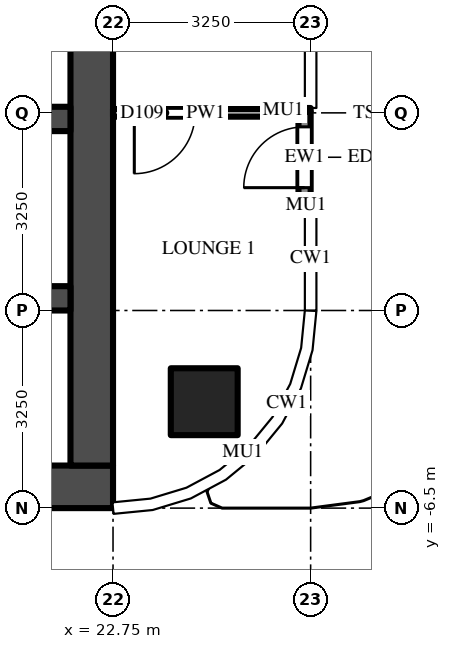
"""IFC4 building model, lengths in metres.
Left out: names, types, materials, properties, quantities, classifications, styles, units other than length and angle.
Written with IfcOpenShell. Run it as: python <this file> out.ifc"""

import sys

from ifc_helpers import new_model, si_unit, direction, frame, frame_2d, origin, origin_2d, place, context, subcontext, project, spatial, rectangle, extrude, source, transform, mapped, element, fill, save


model = new_model("IFC4")
c1 = context("Model", 3, precision=1e-05, world=origin(), true_north=direction((0.0, 1.0)))
c2 = subcontext(c1, "Body", "Model", "MODEL_VIEW")
j1 = project(units=[si_unit("LENGTHUNIT", "METRE"), si_unit("PLANEANGLEUNIT", "RADIAN")], contexts=[c1])
p1 = place(None, origin())
s1 = spatial("IfcSite", under=j1, at=p1, CompositionType="ELEMENT")
p2 = place(p1, origin())
s2 = spatial("IfcBuilding", under=s1, at=p2, CompositionType="ELEMENT")
p3 = place(p2, frame((0.0, 0.0, 220.7)))
s3 = spatial("IfcBuildingStorey", under=s2, at=p3, CompositionType="ELEMENT", Elevation=220.7)
m1 = source(origin(), c2, "Body", "SweptSolid", [
    extrude(rectangle(XDim=1.1, YDim=1.1, at=origin_2d()), origin(), (0.0, 0.0, 1.0), 3.9),
])
p4 = place(p3, frame((24.25, -4.75, 0.0), z_axis=(0.0, 0.0, 1.0), x_axis=(1.0, 0.0, 0.0)))
e1 = element("IfcColumn", 1, at=p4, inside=s3, PredefinedType="COLUMN", context=c2, shape_type="MappedRepresentation", body=[
    mapped(m1, transform((0.0, 0.0, 0.0))),
])
m2 = source(origin(), c2, "Body", "SweptSolid", [
    extrude(rectangle(XDim=16.6, YDim=0.7, at=frame_2d((8.3, 0.0))), origin(), (0.0, 0.0, 1.0), 3.7),
])
p5 = place(p3, frame((6.15, -6.15, 0.0), z_axis=(0.0, 0.0, 1.0), x_axis=(1.0, 0.0, 0.0)))
e2 = element("IfcWall", 2, at=p5, inside=s3, PredefinedType="SHEAR", context=c2, shape_type="MappedRepresentation", body=[
    mapped(m2, transform((0.0, 0.0, 0.0))),
])
m3 = source(origin(), c2, "Body", "SweptSolid", [
    extrude(rectangle(XDim=9.05, YDim=0.7, at=frame_2d((4.525, 0.0))), origin(), (0.0, 0.0, 1.0), 3.7),
])
p6 = place(p3, frame((22.4, -5.8, 0.0), z_axis=(0.0, 0.0, 1.0), x_axis=(0.0, 1.0, 0.0)))
e3 = element("IfcWall", 3, at=p6, inside=s3, PredefinedType="SHEAR", context=c2, shape_type="MappedRepresentation", body=[
    mapped(m3, transform((0.0, 0.0, 0.0))),
])
m4 = source(origin(), c2, "Body", "SweptSolid", [
    extrude(rectangle(XDim=14.85, YDim=0.4, at=frame_2d((7.425, 0.0))), origin(), (0.0, 0.0, 1.0), 3.7),
])
p7 = place(p3, frame((7.2, -0.1, 0.0), z_axis=(0.0, 0.0, 1.0), x_axis=(1.0, 0.0, 0.0)))
e4 = element("IfcWall", 4, at=p7, inside=s3, PredefinedType="SHEAR", context=c2, shape_type="MappedRepresentation", body=[
    mapped(m4, transform((0.0, 0.0, 0.0))),
])
m5 = source(origin(), c2, "Body", "SweptSolid", [
    extrude(rectangle(XDim=1.0, YDim=2.1, at=frame_2d((0.5, 1.05))), frame((0.0, 0.21, 0.0), z_axis=(0.0, -1.0, 0.0), x_axis=(1.0, 0.0, 0.0)), (0.0, 0.0, 1.0), 0.42),
])
p8 = place(p7, frame((7.9, 0.0, 0.0)))
e5 = element("IfcOpeningElement", 5, at=p8, cuts=e4, PredefinedType="OPENING", context=c2, shape_type="MappedRepresentation", body=[
    mapped(m5, transform((0.0, 0.0, 0.0))),
])
m6 = source(origin(), c2, "Body", "SweptSolid", [
    extrude(rectangle(XDim=5.7, YDim=0.4, at=frame_2d((2.85, 0.0))), origin(), (0.0, 0.0, 1.0), 3.7),
])
p9 = place(p3, frame((16.35, -3.05, 0.0), z_axis=(0.0, 0.0, 1.0), x_axis=(1.0, 0.0, 0.0)))
e6 = element("IfcWall", 6, at=p9, inside=s3, PredefinedType="SHEAR", context=c2, shape_type="MappedRepresentation", body=[
    mapped(m6, transform((0.0, 0.0, 0.0))),
])
m7 = source(origin(), c2, "Body", "SweptSolid", [
    extrude(rectangle(XDim=1.5, YDim=0.2, at=frame_2d((0.75, 0.0))), origin(), (0.0, 0.0, 1.0), 3.7),
])
p10 = place(p3, frame((25.9, -1.48, 0.0), z_axis=(0.0, 0.0, 1.0), x_axis=(0.0, 1.0, 0.0)))
e7 = element("IfcWall", 7, at=p10, inside=s3, PredefinedType="SOLIDWALL", context=c2, shape_type="MappedRepresentation", body=[
    mapped(m7, transform((0.0, 0.0, 0.0))),
])
m8 = source(origin(), c2, "Body", "SweptSolid", [
    extrude(rectangle(XDim=1.0, YDim=2.4, at=frame_2d((0.5, 1.2))), frame((0.0, 0.11, 0.0), z_axis=(0.0, -1.0, 0.0), x_axis=(1.0, 0.0, 0.0)), (0.0, 0.0, 1.0), 0.22),
])
p11 = place(p10, frame((0.25, 0.0, 0.0)))
e8 = element("IfcOpeningElement", 8, at=p11, cuts=e7, PredefinedType="OPENING", context=c2, shape_type="MappedRepresentation", body=[
    mapped(m8, transform((0.0, 0.0, 0.0))),
])
m9 = source(origin(), c2, "Body", "SweptSolid", [
    extrude(rectangle(XDim=3.05, YDim=0.125, at=frame_2d((1.525, 0.0))), origin(), (0.0, 0.0, 1.0), 2.78),
])
p12 = place(p3, frame((25.8, 0.0, 0.0), z_axis=(0.0, 0.0, 1.0), x_axis=(-1.0, 0.0, 0.0)))
e9 = element("IfcWall", 9, at=p12, inside=s3, PredefinedType="PARTITIONING", context=c2, shape_type="MappedRepresentation", body=[
    mapped(m9, transform((0.0, 0.0, 0.0))),
])
m10 = source(origin(), c2, "Body", "SweptSolid", [
    extrude(rectangle(XDim=1.0, YDim=2.1, at=frame_2d((0.5, 1.05))), frame((0.0, 0.073, 0.0), z_axis=(0.0, -1.0, 0.0), x_axis=(1.0, 0.0, 0.0)), (0.0, 0.0, 1.0), 0.145),
])
p13 = place(p12, frame((1.7, 0.0, 0.0)))
e10 = element("IfcOpeningElement", 10, at=p13, cuts=e9, PredefinedType="OPENING", context=c2, shape_type="MappedRepresentation", body=[
    mapped(m10, transform((0.0, 0.0, 0.0))),
])
m11 = source(origin(), c2, "Body", "SweptSolid", [
    extrude(rectangle(XDim=1.0, YDim=2.4, at=frame_2d((0.5, 1.2))), frame((0.0, 0.025, 0.0), z_axis=(0.0, -1.0, 0.0), x_axis=(1.0, 0.0, 0.0)), (0.0, 0.0, 1.0), 0.05),
])
p14 = place(p11, origin())
e11 = element("IfcDoor", 11, at=p14, inside=s3, OperationType="SINGLE_SWING_LEFT", PredefinedType="DOOR", context=c2, shape_type="MappedRepresentation", body=[
    mapped(m11, transform((0.0, 0.0, 0.0))),
])
fill(e8, e11)
m12 = source(origin(), c2, "Body", "SweptSolid", [
    extrude(rectangle(XDim=1.0, YDim=2.1, at=frame_2d((0.5, 1.05))), frame((0.0, 0.025, 0.0), z_axis=(0.0, -1.0, 0.0), x_axis=(1.0, 0.0, 0.0)), (0.0, 0.0, 1.0), 0.05),
])
p15 = place(p13, origin())
e12 = element("IfcDoor", 12, at=p15, inside=s3, OperationType="SINGLE_SWING_RIGHT", PredefinedType="DOOR", context=c2, shape_type="MappedRepresentation", body=[
    mapped(m12, transform((0.0, 0.0, 0.0))),
])
fill(e10, e12)
save(model, sys.argv[1])
